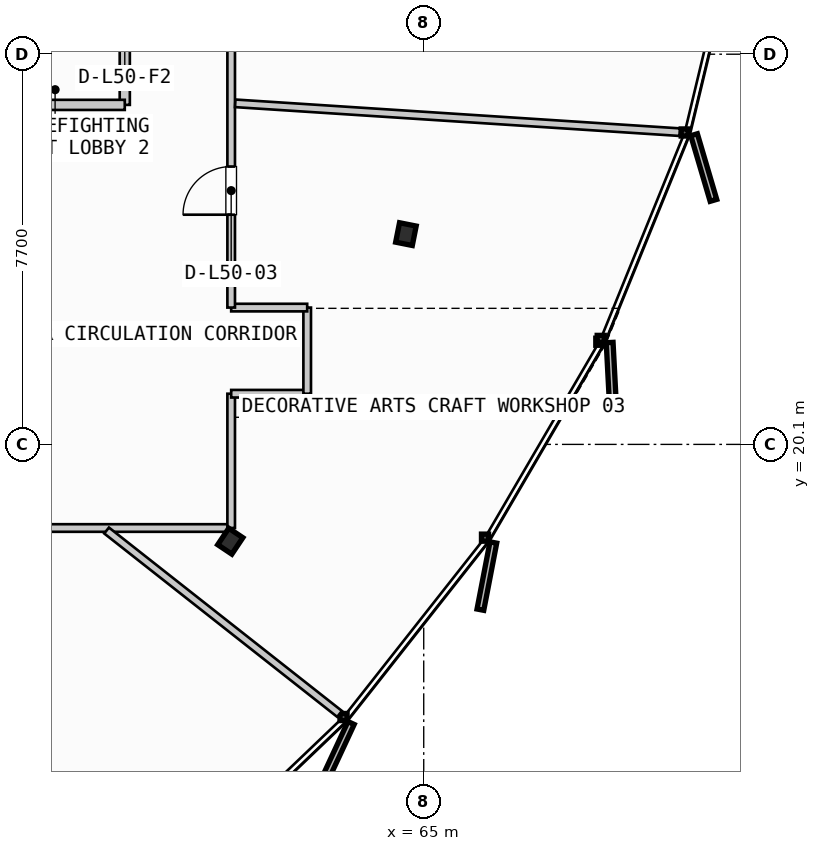
"""IFC4 building model, lengths in metres.
Left out: names, types, materials, properties, quantities, classifications, styles, units other than length and angle.
Written with IfcOpenShell. Run it as: python <this file> out.ifc"""

import sys

from ifc_helpers import new_model, si_unit, direction, frame, frame_2d, origin, origin_2d, place, context, subcontext, project, spatial, rectangle, i_section, extrude, source, transform, mapped, element, fill, save


model = new_model("IFC4")
c1 = context("Model", 3, precision=1e-05, world=origin(), true_north=direction((0.0, 1.0)))
c2 = subcontext(c1, "Body", "Model", "MODEL_VIEW")
j1 = project(units=[si_unit("LENGTHUNIT", "METRE"), si_unit("PLANEANGLEUNIT", "RADIAN")], contexts=[c1])
p1 = place(None, origin())
s1 = spatial("IfcSite", under=j1, at=p1, CompositionType="ELEMENT")
p2 = place(p1, origin())
s2 = spatial("IfcBuilding", under=s1, at=p2, CompositionType="ELEMENT")
p3 = place(p2, frame((0.0, 0.0, 193.9)))
s3 = spatial("IfcBuildingStorey", under=s2, at=p3, CompositionType="ELEMENT", Elevation=193.9)
m1 = source(origin(), c2, "Body", "SweptSolid", [
    extrude(i_section(OverallWidth=0.391, OverallDepth=0.335, WebThickness=0.023, FlangeThickness=0.034, FilletRadius=0.015, at=origin_2d()), origin(), (0.0, 0.0, 1.0), 3.26),
])
for number, where, z_axis, x_axis in (
    (1, (61.183, 18.19, 0.0), (0.0, 0.0, 1.0), (0.831, -0.556, 0.0)),
    (2, (64.649, 24.25, 0.0), (0.0, 0.0, 1.0), (0.981, -0.195, 0.0)),
):
    element("IfcColumn", number, at=place(p3, frame(where, z_axis=z_axis, x_axis=x_axis)), inside=s3, PredefinedType="COLUMN", context=c2, shape_type="MappedRepresentation", body=[
        mapped(m1, transform((0.0, 0.0, 0.0), scale=1.0)),
    ])
p4 = place(p3, frame((59.1, 26.8, 0.0), z_axis=(0.0, 0.0, 1.0), x_axis=(0.0, 1.0, 0.0)))
e3 = element("IfcWall", 3, at=p4, inside=s3, PredefinedType="PARTITIONING", context=c2, shape_type="SweptSolid", body=[
    extrude(rectangle(XDim=4.4, YDim=0.2, at=frame_2d((2.2, 0.0))), origin(), (0.0, 0.0, 1.0), 2.735),
])
p5 = place(p4, frame((1.65, 0.0, 0.0)))
e4 = element("IfcOpeningElement", 4, at=p5, cuts=e3, PredefinedType="OPENING", context=c2, shape_type="SweptSolid", body=[
    extrude(rectangle(XDim=1.05, YDim=2.15, at=frame_2d((0.525, 1.075))), frame((0.0, 0.11, 0.0), z_axis=(0.0, -1.0, 0.0), x_axis=(1.0, 0.0, 0.0)), (0.0, 0.0, 1.0), 0.22),
])
p6 = place(p3, frame((55.885, 26.8, 0.0), z_axis=(0.0, 0.0, 1.0), x_axis=(1.0, 0.0, 0.0)))
e5 = element("IfcWall", 5, at=p6, inside=s3, PredefinedType="PARTITIONING", context=c2, shape_type="SweptSolid", body=[
    extrude(rectangle(XDim=3.215, YDim=0.2, at=frame_2d((1.607, 0.0))), origin(), (0.0, 0.0, 1.0), 2.735),
])
p7 = place(p3, frame((32.85, 18.45, 0.0), z_axis=(0.0, 0.0, 1.0), x_axis=(1.0, 0.0, 0.0)))
e6 = element("IfcWall", 6, at=p7, inside=s3, PredefinedType="PARTITIONING", context=c2, shape_type="SweptSolid", body=[
    extrude(rectangle(XDim=28.35, YDim=0.15, at=frame_2d((14.175, 0.0))), origin(), (0.0, 0.0, 1.0), 2.735),
])
p8 = place(p7, frame((5.46, 0.0, 0.0)))
e7 = element("IfcOpeningElement", 7, at=p8, cuts=e6, PredefinedType="OPENING", context=c2, shape_type="SweptSolid", body=[
    extrude(rectangle(XDim=0.95, YDim=2.15, at=frame_2d((0.475, 1.075))), frame((0.0, 0.085, 0.0), z_axis=(0.0, -1.0, 0.0), x_axis=(1.0, 0.0, 0.0)), (0.0, 0.0, 1.0), 0.17),
])
p9 = place(p7, frame((18.165, 0.0, 0.0)))
e8 = element("IfcOpeningElement", 8, at=p9, cuts=e6, PredefinedType="OPENING", context=c2, shape_type="SweptSolid", body=[
    extrude(rectangle(XDim=0.95, YDim=2.15, at=frame_2d((0.475, 1.075))), frame((0.0, 0.085, 0.0), z_axis=(0.0, -1.0, 0.0), x_axis=(1.0, 0.0, 0.0)), (0.0, 0.0, 1.0), 0.17),
])
p10 = place(p3, frame((61.2, 18.45, 0.0), z_axis=(0.0, 0.0, 1.0), x_axis=(0.0, 1.0, 0.0)))
e9 = element("IfcWall", 9, at=p10, inside=s3, PredefinedType="PARTITIONING", context=c2, shape_type="SweptSolid", body=[
    extrude(rectangle(XDim=2.65, YDim=0.15, at=frame_2d((1.325, 0.0))), origin(), (0.0, 0.0, 1.0), 2.735),
])
p11 = place(p3, frame((61.2, 21.1, 0.0), z_axis=(0.0, 0.0, 1.0), x_axis=(1.0, 0.0, 0.0)))
e10 = element("IfcWall", 10, at=p11, inside=s3, PredefinedType="PARTITIONING", context=c2, shape_type="SweptSolid", body=[
    extrude(rectangle(XDim=1.5, YDim=0.15, at=frame_2d((0.75, 0.0))), origin(), (0.0, 0.0, 1.0), 2.735),
])
p12 = place(p3, frame((62.7, 21.1, 0.0), z_axis=(0.0, 0.0, 1.0), x_axis=(0.0, 1.0, 0.0)))
e11 = element("IfcWall", 11, at=p12, inside=s3, PredefinedType="PARTITIONING", context=c2, shape_type="SweptSolid", body=[
    extrude(rectangle(XDim=1.7, YDim=0.15, at=frame_2d((0.85, 0.0))), origin(), (0.0, 0.0, 1.0), 2.735),
])
p13 = place(p3, frame((62.7, 22.8, 0.0), z_axis=(0.0, 0.0, 1.0), x_axis=(-1.0, 0.0, 0.0)))
e12 = element("IfcWall", 12, at=p13, inside=s3, PredefinedType="PARTITIONING", context=c2, shape_type="SweptSolid", body=[
    extrude(rectangle(XDim=1.5, YDim=0.15, at=frame_2d((0.75, 0.0))), origin(), (0.0, 0.0, 1.0), 2.735),
])
p14 = place(p3, frame((61.2, 22.8, 0.0), z_axis=(0.0, 0.0, 1.0), x_axis=(0.0, 1.0, 0.0)))
e13 = element("IfcWall", 13, at=p14, inside=s3, PredefinedType="PARTITIONING", context=c2, shape_type="SweptSolid", body=[
    extrude(rectangle(XDim=10.0, YDim=0.15, at=frame_2d((5.0, 0.0))), origin(), (0.0, 0.0, 1.0), 2.735),
])
p15 = place(p14, frame((1.833, 0.0, 0.0)))
e14 = element("IfcOpeningElement", 14, at=p15, cuts=e13, PredefinedType="OPENING", context=c2, shape_type="SweptSolid", body=[
    extrude(rectangle(XDim=0.95, YDim=2.15, at=frame_2d((0.475, 1.075))), frame((0.0, 0.085, 0.0), z_axis=(0.0, -1.0, 0.0), x_axis=(1.0, 0.0, 0.0)), (0.0, 0.0, 1.0), 0.17),
])
p16 = place(p14, frame((6.253, 0.0, 0.0)))
e15 = element("IfcOpeningElement", 15, at=p16, cuts=e13, PredefinedType="OPENING", context=c2, shape_type="SweptSolid", body=[
    extrude(rectangle(XDim=0.95, YDim=2.15, at=frame_2d((0.475, 1.075))), frame((0.0, 0.085, 0.0), z_axis=(0.0, -1.0, 0.0), x_axis=(1.0, 0.0, 0.0)), (0.0, 0.0, 1.0), 0.17),
])
p17 = place(p3, frame((58.741, 18.4, 0.0), z_axis=(0.0, 0.0, 1.0), x_axis=(0.785786636701, -0.618497664977, 0.0)))
e16 = element("IfcWall", 16, at=p17, inside=s3, PredefinedType="PARTITIONING", context=c2, shape_type="SweptSolid", body=[
    extrude(rectangle(XDim=5.851, YDim=0.15, at=frame_2d((2.925, 0.0))), origin(), (0.0, 0.0, 1.0), 2.735),
])
p18 = place(p3, frame((61.28, 26.831, 0.0), z_axis=(0.0, 0.0, 1.0), x_axis=(0.99790192977, -0.064743637227, 0.0)))
e17 = element("IfcWall", 17, at=p18, inside=s3, PredefinedType="PARTITIONING", context=c2, shape_type="SweptSolid", body=[
    extrude(rectangle(XDim=8.79, YDim=0.15, at=frame_2d((4.395, 0.0))), origin(), (0.0, 0.0, 1.0), 2.735),
])
m2 = source(origin(), c2, "Body", "SweptSolid", [
    extrude(rectangle(XDim=0.95, YDim=2.15, at=frame_2d((0.475, 1.075))), frame((0.0, 0.025, 0.0), z_axis=(0.0, -1.0, 0.0), x_axis=(1.0, 0.0, 0.0)), (0.0, 0.0, 1.0), 0.05),
])
p19 = place(p15, origin())
e18 = element("IfcDoor", 18, at=p19, inside=s3, OperationType="SINGLE_SWING_LEFT", PredefinedType="DOOR", context=c2, shape_type="MappedRepresentation", body=[
    mapped(m2, transform((0.0, 0.0, 0.0), scale=1.0)),
])
fill(e14, e18)
save(model, sys.argv[1])
